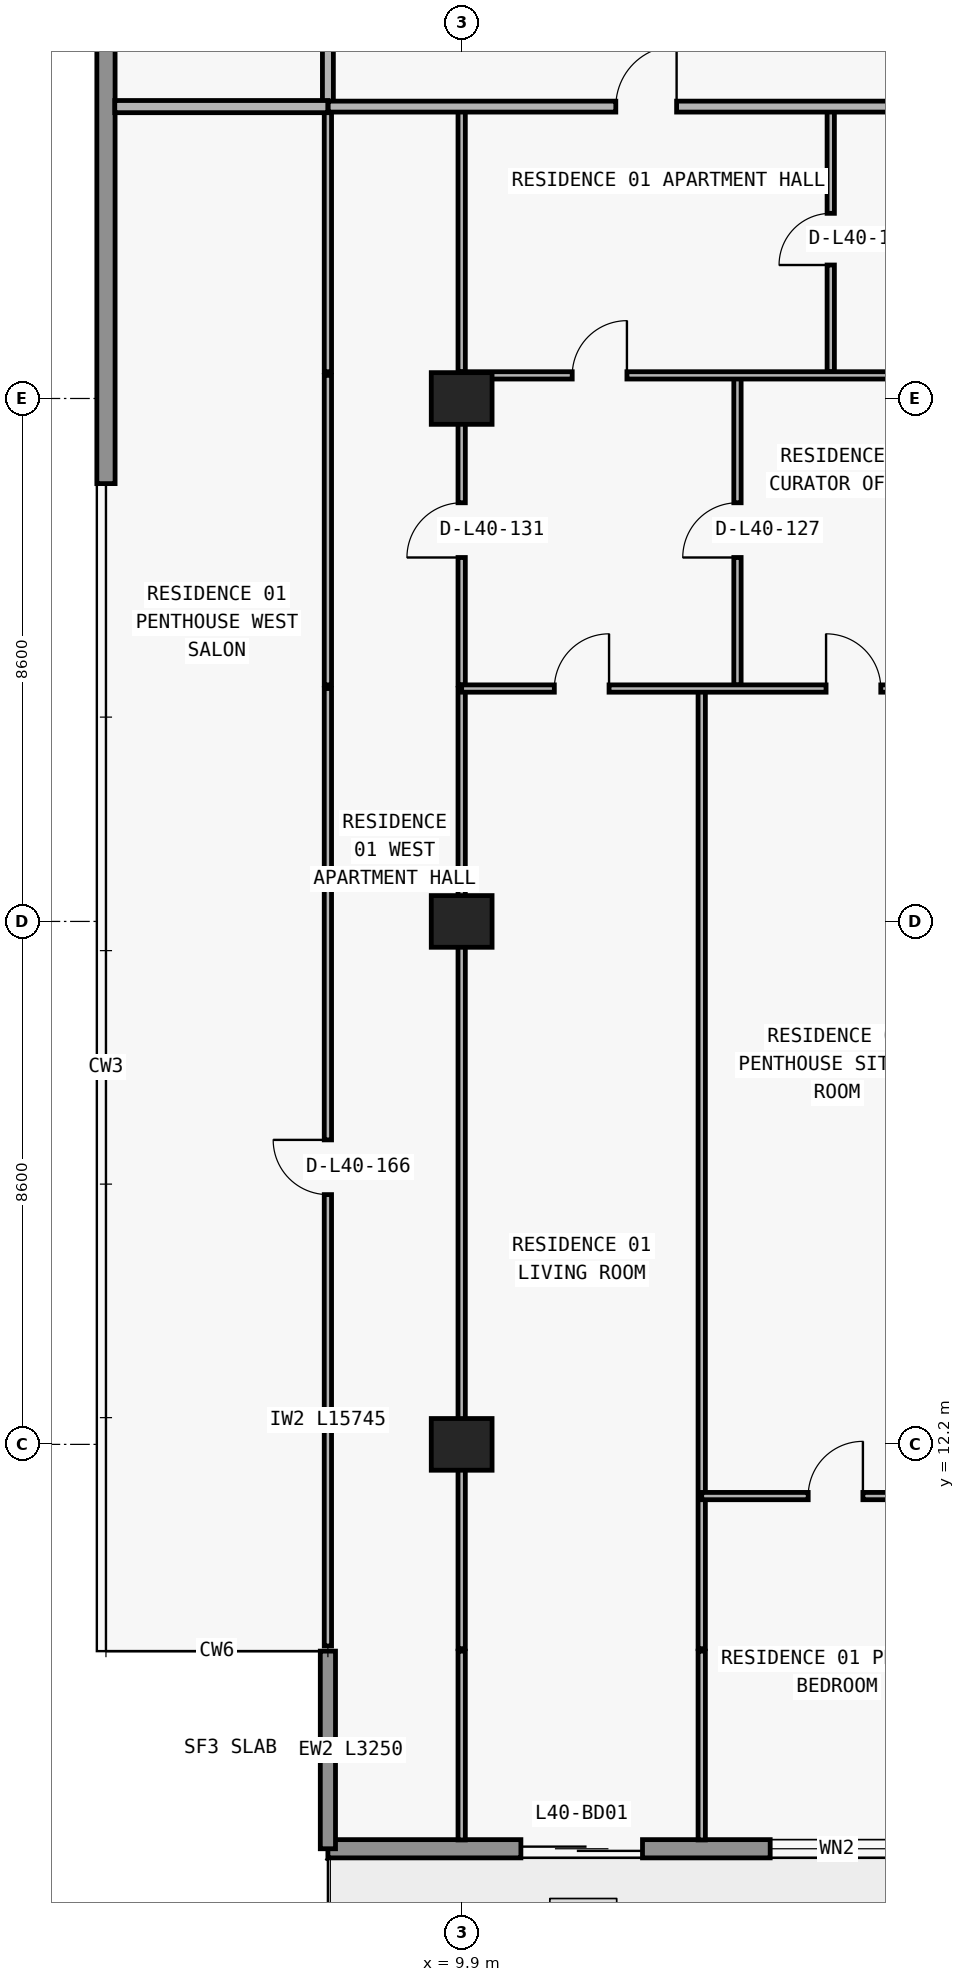
"""IFC4 building model, lengths in metres.
Left out: names, types, materials, properties, quantities, classifications, styles, units other than length and angle.
Written with IfcOpenShell. Run it as: python <this file> out.ifc"""

import sys

from ifc_helpers import new_model, si_unit, direction, frame, frame_2d, origin, origin_2d, place, context, subcontext, project, spatial, rectangle, extrude, element, fill, save


model = new_model("IFC4")
c1 = context("Model", 3, precision=1e-05, world=origin(), true_north=direction((0.0, 1.0)))
c2 = subcontext(c1, "Body", "Model", "MODEL_VIEW")
j1 = project(units=[si_unit("LENGTHUNIT", "METRE"), si_unit("PLANEANGLEUNIT", "RADIAN")], contexts=[c1])
p1 = place(None, origin())
s1 = spatial("IfcSite", under=j1, at=p1, CompositionType="ELEMENT")
p2 = place(p1, origin())
s2 = spatial("IfcBuilding", under=s1, at=p2, CompositionType="ELEMENT")
p3 = place(p2, frame((0.0, 0.0, 145.5)))
s3 = spatial("IfcBuildingStorey", under=s2, at=p3, CompositionType="ELEMENT", Elevation=145.5)
for number, where, z_axis, x_axis in (
    (1, (9.9, 12.2, 0.0), (0.0, 0.0, 1.0), (1.0, 0.0, 0.0)),
    (2, (9.9, 20.8, 0.0), (0.0, 0.0, 1.0), (1.0, 0.0, 0.0)),
    (3, (9.9, 29.4, 0.0), (0.0, 0.0, 1.0), (1.0, 0.0, 0.0)),
):
    element("IfcColumn", number, at=place(p3, frame(where, z_axis=z_axis, x_axis=x_axis)), inside=s3, PredefinedType="COLUMN", context=c2, shape_type="SweptSolid", body=[
        extrude(rectangle(XDim=1.0, YDim=0.85, at=origin_2d()), origin(), (0.0, 0.0, 1.0), 3.05),
    ])
p4 = place(p3, frame((70.1, 5.55, 0.0), z_axis=(0.0, 0.0, 1.0), x_axis=(-1.0, 0.0, 0.0)))
e4 = element("IfcWall", 4, at=p4, inside=s3, PredefinedType="STANDARD", context=c2, shape_type="SweptSolid", body=[
    extrude(rectangle(XDim=62.4, YDim=0.3, at=frame_2d((31.2, 0.0))), origin(), (0.0, 0.0, 1.0), 3.05),
])
p5 = place(p4, frame((57.226, 0.0, 0.0)))
e5 = element("IfcOpeningElement", 5, at=p5, cuts=e4, PredefinedType="OPENING", context=c2, shape_type="SweptSolid", body=[
    extrude(rectangle(XDim=2.0, YDim=2.3, at=frame_2d((1.0, 1.15))), frame((0.0, 0.16, 0.0), z_axis=(0.0, -1.0, 0.0), x_axis=(1.0, 0.0, 0.0)), (0.0, 0.0, 1.0), 0.32),
])
p6 = place(p4, frame((52.926, 0.0, 0.85)))
e6 = element("IfcOpeningElement", 6, at=p6, cuts=e4, PredefinedType="OPENING", context=c2, shape_type="SweptSolid", body=[
    extrude(rectangle(XDim=2.2, YDim=1.55, at=frame_2d((1.1, 0.775))), frame((0.0, 0.16, 0.0), z_axis=(0.0, -1.0, 0.0), x_axis=(1.0, 0.0, 0.0)), (0.0, 0.0, 1.0), 0.32),
])
p7 = place(p4, frame((48.49, 0.0, 0.0)))
e7 = element("IfcOpeningElement", 7, at=p7, cuts=e4, PredefinedType="OPENING", context=c2, shape_type="SweptSolid", body=[
    extrude(rectangle(XDim=2.0, YDim=2.3, at=frame_2d((1.0, 1.15))), frame((0.0, 0.16, 0.0), z_axis=(0.0, -1.0, 0.0), x_axis=(1.0, 0.0, 0.0)), (0.0, 0.0, 1.0), 0.32),
])
p8 = place(p4, frame((44.39, 0.0, 0.85)))
e8 = element("IfcOpeningElement", 8, at=p8, cuts=e4, PredefinedType="OPENING", context=c2, shape_type="SweptSolid", body=[
    extrude(rectangle(XDim=1.8, YDim=1.55, at=frame_2d((0.9, 0.775))), frame((0.0, 0.16, 0.0), z_axis=(0.0, -1.0, 0.0), x_axis=(1.0, 0.0, 0.0)), (0.0, 0.0, 1.0), 0.32),
])
p9 = place(p4, frame((40.426, 0.0, 0.0)))
e9 = element("IfcOpeningElement", 9, at=p9, cuts=e4, PredefinedType="OPENING", context=c2, shape_type="SweptSolid", body=[
    extrude(rectangle(XDim=2.0, YDim=2.3, at=frame_2d((1.0, 1.15))), frame((0.0, 0.16, 0.0), z_axis=(0.0, -1.0, 0.0), x_axis=(1.0, 0.0, 0.0)), (0.0, 0.0, 1.0), 0.32),
])
p10 = place(p4, frame((36.126, 0.0, 0.85)))
e10 = element("IfcOpeningElement", 10, at=p10, cuts=e4, PredefinedType="OPENING", context=c2, shape_type="SweptSolid", body=[
    extrude(rectangle(XDim=2.2, YDim=1.55, at=frame_2d((1.1, 0.775))), frame((0.0, 0.16, 0.0), z_axis=(0.0, -1.0, 0.0), x_axis=(1.0, 0.0, 0.0)), (0.0, 0.0, 1.0), 0.32),
])
p11 = place(p4, frame((32.09, 0.0, 0.0)))
e11 = element("IfcOpeningElement", 11, at=p11, cuts=e4, PredefinedType="OPENING", context=c2, shape_type="SweptSolid", body=[
    extrude(rectangle(XDim=2.0, YDim=2.3, at=frame_2d((1.0, 1.15))), frame((0.0, 0.16, 0.0), z_axis=(0.0, -1.0, 0.0), x_axis=(1.0, 0.0, 0.0)), (0.0, 0.0, 1.0), 0.32),
])
p12 = place(p4, frame((28.21, 0.0, 0.65)))
e12 = element("IfcOpeningElement", 12, at=p12, cuts=e4, PredefinedType="OPENING", context=c2, shape_type="SweptSolid", body=[
    extrude(rectangle(XDim=2.6, YDim=1.85, at=frame_2d((1.3, 0.925))), frame((0.0, 0.16, 0.0), z_axis=(0.0, -1.0, 0.0), x_axis=(1.0, 0.0, 0.0)), (0.0, 0.0, 1.0), 0.32),
])
p13 = place(p4, frame((22.1, 0.0, 0.85)))
e13 = element("IfcOpeningElement", 13, at=p13, cuts=e4, PredefinedType="OPENING", context=c2, shape_type="SweptSolid", body=[
    extrude(rectangle(XDim=2.2, YDim=1.55, at=frame_2d((1.1, 0.775))), frame((0.0, 0.16, 0.0), z_axis=(0.0, -1.0, 0.0), x_axis=(1.0, 0.0, 0.0)), (0.0, 0.0, 1.0), 0.32),
])
p14 = place(p4, frame((16.09, 0.0, 0.0)))
e14 = element("IfcOpeningElement", 14, at=p14, cuts=e4, PredefinedType="OPENING", context=c2, shape_type="SweptSolid", body=[
    extrude(rectangle(XDim=2.0, YDim=2.3, at=frame_2d((1.0, 1.15))), frame((0.0, 0.16, 0.0), z_axis=(0.0, -1.0, 0.0), x_axis=(1.0, 0.0, 0.0)), (0.0, 0.0, 1.0), 0.32),
])
p15 = place(p4, frame((11.41, 0.0, 0.65)))
e15 = element("IfcOpeningElement", 15, at=p15, cuts=e4, PredefinedType="OPENING", context=c2, shape_type="SweptSolid", body=[
    extrude(rectangle(XDim=2.6, YDim=1.85, at=frame_2d((1.3, 0.925))), frame((0.0, 0.16, 0.0), z_axis=(0.0, -1.0, 0.0), x_axis=(1.0, 0.0, 0.0)), (0.0, 0.0, 1.0), 0.32),
])
p16 = place(p4, frame((5.3, 0.0, 0.85)))
e16 = element("IfcOpeningElement", 16, at=p16, cuts=e4, PredefinedType="OPENING", context=c2, shape_type="SweptSolid", body=[
    extrude(rectangle(XDim=2.2, YDim=1.55, at=frame_2d((1.1, 0.775))), frame((0.0, 0.16, 0.0), z_axis=(0.0, -1.0, 0.0), x_axis=(1.0, 0.0, 0.0)), (0.0, 0.0, 1.0), 0.32),
])
p17 = place(p3, frame((7.7, 8.8, 0.0), z_axis=(0.0, 0.0, 1.0), x_axis=(0.0, -1.0, 0.0)))
e17 = element("IfcWall", 17, at=p17, inside=s3, PredefinedType="ELEMENTEDWALL", context=c2, shape_type="SweptSolid", body=[
    extrude(rectangle(XDim=3.25, YDim=0.25, at=frame_2d((1.625, 0.0))), origin(), (0.0, 0.0, 1.0), 3.05),
])
p18 = place(p3, frame((4.05, 28.0, 0.0), z_axis=(0.0, 0.0, 1.0), x_axis=(0.0, 1.0, 0.0)))
e18 = element("IfcWall", 18, at=p18, inside=s3, PredefinedType="STANDARD", context=c2, shape_type="SweptSolid", body=[
    extrude(rectangle(XDim=19.2, YDim=0.3, at=frame_2d((9.6, 0.0))), origin(), (0.0, 0.0, 1.0), 3.05),
])
p19 = place(p3, frame((7.7, 8.885, 0.0), z_axis=(0.0, 0.0, 1.0), x_axis=(0.0, 1.0, 0.0)))
e19 = element("IfcWall", 19, at=p19, inside=s3, PredefinedType="PARTITIONING", context=c2, shape_type="SweptSolid", body=[
    extrude(rectangle(XDim=15.745, YDim=0.12, at=frame_2d((7.873, 0.0))), origin(), (0.0, 0.0, 1.0), 3.05),
])
p20 = place(p19, frame((7.423, 0.0, 0.0)))
e20 = element("IfcOpeningElement", 20, at=p20, cuts=e19, PredefinedType="OPENING", context=c2, shape_type="SweptSolid", body=[
    extrude(rectangle(XDim=0.9, YDim=2.15, at=frame_2d((0.45, 1.075))), frame((0.0, 0.07, 0.0), z_axis=(0.0, -1.0, 0.0), x_axis=(1.0, 0.0, 0.0)), (0.0, 0.0, 1.0), 0.14),
])
p21 = place(p3, frame((7.7, 24.69, 0.0), z_axis=(0.0, 0.0, 1.0), x_axis=(0.0, 1.0, 0.0)))
e21 = element("IfcWall", 21, at=p21, inside=s3, PredefinedType="PARTITIONING", context=c2, shape_type="SweptSolid", body=[
    extrude(rectangle(XDim=5.09, YDim=0.12, at=frame_2d((2.545, 0.0))), origin(), (0.0, 0.0, 1.0), 3.05),
])
p22 = place(p3, frame((7.7, 29.84, 0.0), z_axis=(0.0, 0.0, 1.0), x_axis=(0.0, 1.0, 0.0)))
e22 = element("IfcWall", 22, at=p22, inside=s3, PredefinedType="PARTITIONING", context=c2, shape_type="SweptSolid", body=[
    extrude(rectangle(XDim=4.36, YDim=0.12, at=frame_2d((2.18, 0.0))), origin(), (0.0, 0.0, 1.0), 3.05),
])
p23 = place(p3, frame((7.7, 34.205, 0.0), z_axis=(0.0, 0.0, 1.0), x_axis=(0.0, 1.0, 0.0)))
e23 = element("IfcWall", 23, at=p23, inside=s3, PredefinedType="PARTITIONING", context=c2, shape_type="SweptSolid", body=[
    extrude(rectangle(XDim=2.745, YDim=0.18, at=frame_2d((1.373, 0.0))), origin(), (0.0, 0.0, 1.0), 3.05),
])
p24 = place(p3, frame((9.9, 5.695, 0.0), z_axis=(0.0, 0.0, 1.0), x_axis=(0.0, 1.0, 0.0)))
e24 = element("IfcWall", 24, at=p24, inside=s3, PredefinedType="PARTITIONING", context=c2, shape_type="SweptSolid", body=[
    extrude(rectangle(XDim=3.105, YDim=0.12, at=frame_2d((1.552, 0.0))), origin(), (0.0, 0.0, 1.0), 3.05),
])
p25 = place(p3, frame((9.9, 8.84, 0.0), z_axis=(0.0, 0.0, 1.0), x_axis=(0.0, 1.0, 0.0)))
e25 = element("IfcWall", 25, at=p25, inside=s3, PredefinedType="PARTITIONING", context=c2, shape_type="SweptSolid", body=[
    extrude(rectangle(XDim=15.79, YDim=0.12, at=frame_2d((7.895, 0.0))), origin(), (0.0, 0.0, 1.0), 2.174),
])
p26 = place(p3, frame((9.9, 24.69, 0.0), z_axis=(0.0, 0.0, 1.0), x_axis=(0.0, 1.0, 0.0)))
e26 = element("IfcWall", 26, at=p26, inside=s3, PredefinedType="PARTITIONING", context=c2, shape_type="SweptSolid", body=[
    extrude(rectangle(XDim=5.09, YDim=0.12, at=frame_2d((2.545, 0.0))), origin(), (0.0, 0.0, 1.0), 2.174),
])
p27 = place(p26, frame((2.095, 0.0, 0.0)))
e27 = element("IfcOpeningElement", 27, at=p27, cuts=e26, PredefinedType="OPENING", context=c2, shape_type="SweptSolid", body=[
    extrude(rectangle(XDim=0.9, YDim=2.124, at=frame_2d((0.45, 1.062))), frame((0.0, 0.07, 0.0), z_axis=(0.0, -1.0, 0.0), x_axis=(1.0, 0.0, 0.0)), (0.0, 0.0, 1.0), 0.14),
])
p28 = place(p3, frame((9.9, 29.84, 0.0), z_axis=(0.0, 0.0, 1.0), x_axis=(0.0, 1.0, 0.0)))
e28 = element("IfcWall", 28, at=p28, inside=s3, PredefinedType="PARTITIONING", context=c2, shape_type="SweptSolid", body=[
    extrude(rectangle(XDim=4.36, YDim=0.12, at=frame_2d((2.18, 0.0))), origin(), (0.0, 0.0, 1.0), 2.174),
])
p29 = place(p3, frame((13.848, 5.695, 0.0), z_axis=(0.0, 0.0, 1.0), x_axis=(0.0, 1.0, 0.0)))
e29 = element("IfcWall", 29, at=p29, inside=s3, PredefinedType="PARTITIONING", context=c2, shape_type="SweptSolid", body=[
    extrude(rectangle(XDim=3.105, YDim=0.12, at=frame_2d((1.552, 0.0))), origin(), (0.0, 0.0, 1.0), 3.05),
])
p30 = place(p3, frame((13.848, 8.84, 0.0), z_axis=(0.0, 0.0, 1.0), x_axis=(0.0, 1.0, 0.0)))
e30 = element("IfcWall", 30, at=p30, inside=s3, PredefinedType="PARTITIONING", context=c2, shape_type="SweptSolid", body=[
    extrude(rectangle(XDim=15.79, YDim=0.12, at=frame_2d((7.895, 0.0))), origin(), (0.0, 0.0, 1.0), 3.05),
])
p31 = place(p3, frame((14.436, 24.69, 0.0), z_axis=(0.0, 0.0, 1.0), x_axis=(0.0, 1.0, 0.0)))
e31 = element("IfcWall", 31, at=p31, inside=s3, PredefinedType="PARTITIONING", context=c2, shape_type="SweptSolid", body=[
    extrude(rectangle(XDim=5.09, YDim=0.12, at=frame_2d((2.545, 0.0))), origin(), (0.0, 0.0, 1.0), 3.05),
])
p32 = place(p31, frame((2.095, 0.0, 0.0)))
e32 = element("IfcOpeningElement", 32, at=p32, cuts=e31, PredefinedType="OPENING", context=c2, shape_type="SweptSolid", body=[
    extrude(rectangle(XDim=0.9, YDim=2.15, at=frame_2d((0.45, 1.075))), frame((0.0, 0.07, 0.0), z_axis=(0.0, -1.0, 0.0), x_axis=(1.0, 0.0, 0.0)), (0.0, 0.0, 1.0), 0.14),
])
p33 = place(p3, frame((15.97, 29.84, 0.0), z_axis=(0.0, 0.0, 1.0), x_axis=(0.0, 1.0, 0.0)))
e33 = element("IfcWall", 33, at=p33, inside=s3, PredefinedType="PARTITIONING", context=c2, shape_type="SweptSolid", body=[
    extrude(rectangle(XDim=4.36, YDim=0.12, at=frame_2d((2.18, 0.0))), origin(), (0.0, 0.0, 1.0), 3.05),
])
p34 = place(p33, frame((1.755, 0.0, 0.0)))
e34 = element("IfcOpeningElement", 34, at=p34, cuts=e33, PredefinedType="OPENING", context=c2, shape_type="SweptSolid", body=[
    extrude(rectangle(XDim=0.85, YDim=2.1, at=frame_2d((0.425, 1.05))), frame((0.0, 0.07, 0.0), z_axis=(0.0, -1.0, 0.0), x_axis=(1.0, 0.0, 0.0)), (0.0, 0.0, 1.0), 0.14),
])
p35 = place(p3, frame((13.848, 11.35, 0.0), z_axis=(0.0, 0.0, 1.0), x_axis=(1.0, 0.0, 0.0)))
e35 = element("IfcWall", 35, at=p35, inside=s3, PredefinedType="PARTITIONING", context=c2, shape_type="SweptSolid", body=[
    extrude(rectangle(XDim=4.402, YDim=0.12, at=frame_2d((2.201, 0.0))), origin(), (0.0, 0.0, 1.0), 3.05),
])
p36 = place(p35, frame((1.751, 0.0, 0.0)))
e36 = element("IfcOpeningElement", 36, at=p36, cuts=e35, PredefinedType="OPENING", context=c2, shape_type="SweptSolid", body=[
    extrude(rectangle(XDim=0.9, YDim=2.15, at=frame_2d((0.45, 1.075))), frame((0.0, 0.07, 0.0), z_axis=(0.0, -1.0, 0.0), x_axis=(1.0, 0.0, 0.0)), (0.0, 0.0, 1.0), 0.14),
])
p37 = place(p3, frame((9.9, 24.63, 0.0), z_axis=(0.0, 0.0, 1.0), x_axis=(1.0, 0.0, 0.0)))
e37 = element("IfcWall", 37, at=p37, inside=s3, PredefinedType="PARTITIONING", context=c2, shape_type="SweptSolid", body=[
    extrude(rectangle(XDim=8.35, YDim=0.12, at=frame_2d((4.175, 0.0))), origin(), (0.0, 0.0, 1.0), 3.05),
])
p38 = place(p37, frame((1.524, 0.0, 0.0)))
e38 = element("IfcOpeningElement", 38, at=p38, cuts=e37, PredefinedType="OPENING", context=c2, shape_type="SweptSolid", body=[
    extrude(rectangle(XDim=0.9, YDim=2.15, at=frame_2d((0.45, 1.075))), frame((0.0, 0.07, 0.0), z_axis=(0.0, -1.0, 0.0), x_axis=(1.0, 0.0, 0.0)), (0.0, 0.0, 1.0), 0.14),
])
p39 = place(p37, frame((5.993, 0.0, 0.0)))
e39 = element("IfcOpeningElement", 39, at=p39, cuts=e37, PredefinedType="OPENING", context=c2, shape_type="SweptSolid", body=[
    extrude(rectangle(XDim=0.9, YDim=2.15, at=frame_2d((0.45, 1.075))), frame((0.0, 0.07, 0.0), z_axis=(0.0, -1.0, 0.0), x_axis=(1.0, 0.0, 0.0)), (0.0, 0.0, 1.0), 0.14),
])
p40 = place(p3, frame((9.9, 29.78, 0.0), z_axis=(0.0, 0.0, 1.0), x_axis=(1.0, 0.0, 0.0)))
e40 = element("IfcWall", 40, at=p40, inside=s3, PredefinedType="PARTITIONING", context=c2, shape_type="SweptSolid", body=[
    extrude(rectangle(XDim=8.35, YDim=0.12, at=frame_2d((4.175, 0.0))), origin(), (0.0, 0.0, 1.0), 3.05),
])
p41 = place(p40, frame((1.818, 0.0, 0.0)))
e41 = element("IfcOpeningElement", 41, at=p41, cuts=e40, PredefinedType="OPENING", context=c2, shape_type="SweptSolid", body=[
    extrude(rectangle(XDim=0.9, YDim=2.15, at=frame_2d((0.45, 1.075))), frame((0.0, 0.07, 0.0), z_axis=(0.0, -1.0, 0.0), x_axis=(1.0, 0.0, 0.0)), (0.0, 0.0, 1.0), 0.14),
])
p42 = place(p3, frame((4.195, 34.2, 0.0), z_axis=(0.0, 0.0, 1.0), x_axis=(1.0, 0.0, 0.0)))
e42 = element("IfcWall", 42, at=p42, inside=s3, PredefinedType="PARTITIONING", context=c2, shape_type="SweptSolid", body=[
    extrude(rectangle(XDim=3.505, YDim=0.2, at=frame_2d((1.752, 0.0))), origin(), (0.0, 0.0, 1.0), 3.05),
])
p43 = place(p3, frame((7.705, 34.2, 0.0), z_axis=(0.0, 0.0, 1.0), x_axis=(1.0, 0.0, 0.0)))
e43 = element("IfcWall", 43, at=p43, inside=s3, PredefinedType="PARTITIONING", context=c2, shape_type="SweptSolid", body=[
    extrude(rectangle(XDim=10.545, YDim=0.18, at=frame_2d((5.272, 0.0))), origin(), (0.0, 0.0, 1.0), 3.05),
])
p44 = place(p43, frame((4.73, 0.0, 0.0)))
e44 = element("IfcOpeningElement", 44, at=p44, cuts=e43, PredefinedType="OPENING", context=c2, shape_type="SweptSolid", body=[
    extrude(rectangle(XDim=1.0, YDim=2.2, at=frame_2d((0.5, 1.1))), frame((0.0, 0.1, 0.0), z_axis=(0.0, -1.0, 0.0), x_axis=(1.0, 0.0, 0.0)), (0.0, 0.0, 1.0), 0.2),
])
p45 = place(p5, origin())
e45 = element("IfcDoor", 45, at=p45, inside=s3, OperationType="DOUBLE_DOOR_SLIDING", PredefinedType="DOOR", context=c2, shape_type="SweptSolid", body=[
    extrude(rectangle(XDim=2.0, YDim=2.3, at=frame_2d((1.0, 1.15))), frame((0.0, 0.025, 0.0), z_axis=(0.0, -1.0, 0.0), x_axis=(1.0, 0.0, 0.0)), (0.0, 0.0, 1.0), 0.05),
])
fill(e5, e45)
p46 = place(p6, origin())
e46 = element("IfcWindow", 46, at=p46, inside=s3, PartitioningType="SINGLE_PANEL", PredefinedType="WINDOW", context=c2, shape_type="SweptSolid", body=[
    extrude(rectangle(XDim=2.2, YDim=1.55, at=frame_2d((1.1, 0.775))), frame((0.0, 0.03, 0.0), z_axis=(0.0, -1.0, 0.0), x_axis=(1.0, 0.0, 0.0)), (0.0, 0.0, 1.0), 0.06),
])
fill(e6, e46)
p47 = place(p44, origin())
e47 = element("IfcDoor", 47, at=p47, inside=s3, OperationType="SINGLE_SWING_RIGHT", PredefinedType="DOOR", context=c2, shape_type="SweptSolid", body=[
    extrude(rectangle(XDim=1.0, YDim=2.2, at=frame_2d((0.5, 1.1))), frame((0.0, 0.025, 0.0), z_axis=(0.0, -1.0, 0.0), x_axis=(1.0, 0.0, 0.0)), (0.0, 0.0, 1.0), 0.05),
])
fill(e44, e47)
p48 = place(p34, origin())
e48 = element("IfcDoor", 48, at=p48, inside=s3, OperationType="SINGLE_SWING_LEFT", PredefinedType="DOOR", context=c2, shape_type="SweptSolid", body=[
    extrude(rectangle(XDim=0.85, YDim=2.1, at=frame_2d((0.425, 1.05))), frame((0.0, 0.025, 0.0), z_axis=(0.0, -1.0, 0.0), x_axis=(1.0, 0.0, 0.0)), (0.0, 0.0, 1.0), 0.05),
])
fill(e34, e48)
p49 = place(p41, origin())
e49 = element("IfcDoor", 49, at=p49, inside=s3, OperationType="SINGLE_SWING_RIGHT", PredefinedType="DOOR", context=c2, shape_type="SweptSolid", body=[
    extrude(rectangle(XDim=0.9, YDim=2.15, at=frame_2d((0.45, 1.075))), frame((0.0, 0.025, 0.0), z_axis=(0.0, -1.0, 0.0), x_axis=(1.0, 0.0, 0.0)), (0.0, 0.0, 1.0), 0.05),
])
fill(e41, e49)
p50 = place(p32, origin())
e50 = element("IfcDoor", 50, at=p50, inside=s3, OperationType="SINGLE_SWING_LEFT", PredefinedType="DOOR", context=c2, shape_type="SweptSolid", body=[
    extrude(rectangle(XDim=0.9, YDim=2.15, at=frame_2d((0.45, 1.075))), frame((0.0, 0.025, 0.0), z_axis=(0.0, -1.0, 0.0), x_axis=(1.0, 0.0, 0.0)), (0.0, 0.0, 1.0), 0.05),
])
fill(e32, e50)
p51 = place(p38, origin())
e51 = element("IfcDoor", 51, at=p51, inside=s3, OperationType="SINGLE_SWING_RIGHT", PredefinedType="DOOR", context=c2, shape_type="SweptSolid", body=[
    extrude(rectangle(XDim=0.9, YDim=2.15, at=frame_2d((0.45, 1.075))), frame((0.0, 0.025, 0.0), z_axis=(0.0, -1.0, 0.0), x_axis=(1.0, 0.0, 0.0)), (0.0, 0.0, 1.0), 0.05),
])
fill(e38, e51)
p52 = place(p39, origin())
e52 = element("IfcDoor", 52, at=p52, inside=s3, OperationType="SINGLE_SWING_LEFT", PredefinedType="DOOR", context=c2, shape_type="SweptSolid", body=[
    extrude(rectangle(XDim=0.9, YDim=2.15, at=frame_2d((0.45, 1.075))), frame((0.0, 0.025, 0.0), z_axis=(0.0, -1.0, 0.0), x_axis=(1.0, 0.0, 0.0)), (0.0, 0.0, 1.0), 0.05),
])
fill(e39, e52)
p53 = place(p36, origin())
e53 = element("IfcDoor", 53, at=p53, inside=s3, OperationType="SINGLE_SWING_RIGHT", PredefinedType="DOOR", context=c2, shape_type="SweptSolid", body=[
    extrude(rectangle(XDim=0.9, YDim=2.15, at=frame_2d((0.45, 1.075))), frame((0.0, 0.025, 0.0), z_axis=(0.0, -1.0, 0.0), x_axis=(1.0, 0.0, 0.0)), (0.0, 0.0, 1.0), 0.05),
])
fill(e36, e53)
p54 = place(p27, origin())
e54 = element("IfcDoor", 54, at=p54, inside=s3, OperationType="SINGLE_SWING_LEFT", PredefinedType="DOOR", context=c2, shape_type="SweptSolid", body=[
    extrude(rectangle(XDim=0.9, YDim=2.124, at=frame_2d((0.45, 1.062))), frame((0.0, 0.025, 0.0), z_axis=(0.0, -1.0, 0.0), x_axis=(1.0, 0.0, 0.0)), (0.0, 0.0, 1.0), 0.05),
])
fill(e27, e54)
p55 = place(p20, origin())
e55 = element("IfcDoor", 55, at=p55, inside=s3, OperationType="SINGLE_SWING_RIGHT", PredefinedType="DOOR", context=c2, shape_type="SweptSolid", body=[
    extrude(rectangle(XDim=0.9, YDim=2.15, at=frame_2d((0.45, 1.075))), frame((0.0, 0.025, 0.0), z_axis=(0.0, -1.0, 0.0), x_axis=(1.0, 0.0, 0.0)), (0.0, 0.0, 1.0), 0.05),
])
fill(e20, e55)
save(model, sys.argv[1])
